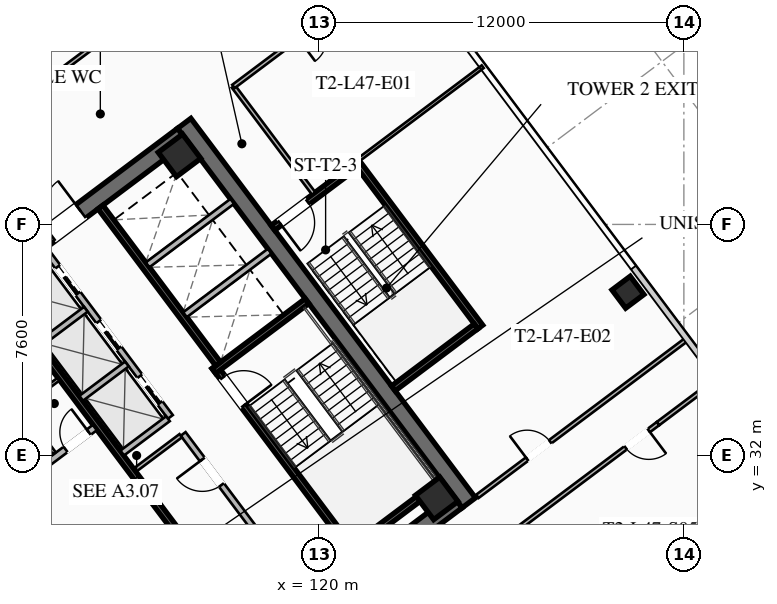
"""IFC4 building model, lengths in metres.
Left out: names, types, materials, properties, quantities, classifications, styles, units other than length and angle.
Written with IfcOpenShell. Run it as: python <this file> out.ifc"""

import sys

from ifc_helpers import new_model, si_unit, direction, frame, frame_2d, origin, origin_2d, place, context, subcontext, project, spatial, rectangle, hollow_rectangle, extrude, element, fill, save


model = new_model("IFC4")
c1 = context("Model", 3, precision=1e-05, world=origin(), true_north=direction((0.0, 1.0)))
c2 = subcontext(c1, "Body", "Model", "MODEL_VIEW")
j1 = project(units=[si_unit("LENGTHUNIT", "METRE"), si_unit("PLANEANGLEUNIT", "RADIAN")], contexts=[c1])
p1 = place(None, origin())
s1 = spatial("IfcSite", under=j1, at=p1, CompositionType="ELEMENT")
p2 = place(p1, origin())
s2 = spatial("IfcBuilding", under=s1, at=p2, CompositionType="ELEMENT")
p3 = place(p2, frame((0.0, 0.0, 174.75)))
s3 = spatial("IfcBuildingStorey", under=s2, at=p3, CompositionType="ELEMENT", Elevation=174.75)
for number, where, z_axis, x_axis in (
    (1, (112.436, 21.077, 0.0), (0.0, 0.0, 1.0), (-0.6, 0.8, 0.0)),
    (2, (115.564, 42.923, 0.0), (0.0, 0.0, 1.0), (0.6, -0.8, 0.0)),
):
    element("IfcWall", number, at=place(p3, frame(where, z_axis=z_axis, x_axis=x_axis)), inside=s3, PredefinedType="SHEAR", context=c2, shape_type="SweptSolid", body=[
        extrude(rectangle(XDim=15.6, YDim=0.55, at=frame_2d((7.8, 0.0))), origin(), (0.0, 0.0, 1.0), 3.55),
    ])
p4 = place(p3, frame((124.539, 30.498, 0.0), z_axis=(0.0, 0.0, 1.0), x_axis=(-0.799998054672, -0.600002593761, 0.0)))
e3 = element("IfcWall", 3, at=p4, inside=s3, PredefinedType="SHEAR", context=c2, shape_type="SweptSolid", body=[
    extrude(rectangle(XDim=15.06, YDim=0.55, at=frame_2d((7.53, 0.0))), origin(), (0.0, 0.0, 1.0), 3.55),
])
p5 = place(p4, frame((9.23, 0.0, 0.0)))
e4 = element("IfcOpeningElement", 4, at=p5, cuts=e3, PredefinedType="OPENING", context=c2, shape_type="SweptSolid", body=[
    extrude(rectangle(XDim=1.25, YDim=2.25, at=frame_2d((0.625, 1.125))), frame((0.0, 0.285, 0.0), z_axis=(0.0, -1.0, 0.0), x_axis=(1.0, 0.0, 0.0)), (0.0, 0.0, 1.0), 0.57),
])
p6 = place(p4, frame((4.18, 0.0, 0.0)))
e5 = element("IfcOpeningElement", 5, at=p6, cuts=e3, PredefinedType="OPENING", context=c2, shape_type="SweptSolid", body=[
    extrude(rectangle(XDim=1.25, YDim=2.25, at=frame_2d((0.625, 1.125))), frame((0.0, 0.285, 0.0), z_axis=(0.0, -1.0, 0.0), x_axis=(1.0, 0.0, 0.0)), (0.0, 0.0, 1.0), 0.57),
])
p7 = place(p3, frame((103.461, 33.502, 0.0), z_axis=(0.0, 0.0, 1.0), x_axis=(0.799998054672, 0.600002593761, 0.0)))
e6 = element("IfcWall", 6, at=p7, inside=s3, PredefinedType="SHEAR", context=c2, shape_type="SweptSolid", body=[
    extrude(rectangle(XDim=15.06, YDim=0.55, at=frame_2d((7.53, 0.0))), origin(), (0.0, 0.0, 1.0), 3.55),
])
p8 = place(p7, frame((4.58, 0.0, 0.0)))
e7 = element("IfcOpeningElement", 7, at=p8, cuts=e6, PredefinedType="OPENING", context=c2, shape_type="SweptSolid", body=[
    extrude(rectangle(XDim=1.25, YDim=2.25, at=frame_2d((0.625, 1.125))), frame((0.0, 0.285, 0.0), z_axis=(0.0, -1.0, 0.0), x_axis=(1.0, 0.0, 0.0)), (0.0, 0.0, 1.0), 0.57),
])
p9 = place(p7, frame((9.63, 0.0, 0.0)))
e8 = element("IfcOpeningElement", 8, at=p9, cuts=e6, PredefinedType="OPENING", context=c2, shape_type="SweptSolid", body=[
    extrude(rectangle(XDim=1.25, YDim=2.25, at=frame_2d((0.625, 1.125))), frame((0.0, 0.285, 0.0), z_axis=(0.0, -1.0, 0.0), x_axis=(1.0, 0.0, 0.0)), (0.0, 0.0, 1.0), 0.57),
])
for number, where, z_axis, x_axis in (
    (9, (123.87, 30.59, 0.0), (0.0, 0.0, 1.0), (0.8, 0.6, 0.0)),
    (10, (115.41, 41.87, 0.0), (0.0, 0.0, 1.0), (0.8, 0.6, 0.0)),
):
    element("IfcColumn", number, at=place(p3, frame(where, z_axis=z_axis, x_axis=x_axis)), inside=s3, PredefinedType="COLUMN", context=c2, shape_type="SweptSolid", body=[
        extrude(hollow_rectangle(XDim=1.0, YDim=1.0, WallThickness=0.04, at=origin_2d()), origin(), (0.0, 0.0, 1.0), 3.37),
    ])
p10 = place(p3, frame((130.16, 37.37, 0.0), z_axis=(0.0, 0.0, 1.0), x_axis=(0.799999996291, 0.600000004945, 0.0)))
e11 = element("IfcColumn", 11, at=p10, inside=s3, PredefinedType="COLUMN", context=c2, shape_type="SweptSolid", body=[
    extrude(hollow_rectangle(XDim=0.75, YDim=0.75, WallThickness=0.032, at=origin_2d()), origin(), (0.0, 0.0, 1.0), 3.37),
])
p11 = place(p3, frame((111.44, 29.08, 0.0), z_axis=(0.0, 0.0, 1.0), x_axis=(-0.59999029481, 0.8000072788, 0.0)))
e12 = element("IfcWall", 12, at=p11, inside=s3, PredefinedType="SHEAR", context=c2, shape_type="SweptSolid", body=[
    extrude(rectangle(XDim=8.05, YDim=0.2, at=frame_2d((4.025, 0.0))), origin(), (0.0, 0.0, 1.0), 3.37),
])
p12 = place(p11, frame((0.45, 0.0, 0.0)))
e13 = element("IfcOpeningElement", 13, at=p12, cuts=e12, PredefinedType="OPENING", context=c2, shape_type="SweptSolid", body=[
    extrude(rectangle(XDim=1.15, YDim=2.2, at=frame_2d((0.575, 1.1))), frame((0.0, 0.11, 0.0), z_axis=(0.0, -1.0, 0.0), x_axis=(1.0, 0.0, 0.0)), (0.0, 0.0, 1.0), 0.22),
])
p13 = place(p3, frame((116.56, 34.92, 0.0), z_axis=(0.0, 0.0, 1.0), x_axis=(0.59999029481, -0.8000072788, 0.0)))
e14 = element("IfcWall", 14, at=p13, inside=s3, PredefinedType="SHEAR", context=c2, shape_type="SweptSolid", body=[
    extrude(rectangle(XDim=8.05, YDim=0.2, at=frame_2d((4.025, 0.0))), origin(), (0.0, 0.0, 1.0), 3.37),
])
p14 = place(p13, frame((0.45, 0.0, 0.0)))
e15 = element("IfcOpeningElement", 15, at=p14, cuts=e14, PredefinedType="OPENING", context=c2, shape_type="SweptSolid", body=[
    extrude(rectangle(XDim=1.15, YDim=2.2, at=frame_2d((0.575, 1.1))), frame((0.0, 0.11, 0.0), z_axis=(0.0, -1.0, 0.0), x_axis=(1.0, 0.0, 0.0)), (0.0, 0.0, 1.0), 0.22),
])
for number, where, z_axis, x_axis in (
    (16, (116.54, 34.78, 0.0), (0.0, 0.0, 1.0), (0.8, 0.6, 0.0)),
    (17, (120.98, 28.86, 0.0), (0.0, 0.0, 1.0), (0.8, 0.6, 0.0)),
):
    element("IfcWall", number, at=place(p3, frame(where, z_axis=z_axis, x_axis=x_axis)), inside=s3, PredefinedType="SHEAR", context=c2, shape_type="SweptSolid", body=[
        extrude(rectangle(XDim=3.83, YDim=0.2, at=frame_2d((1.915, 0.0))), origin(), (0.0, 0.0, 1.0), 3.37),
    ])
p15 = place(p3, frame((117.998, 25.936, 0.0), z_axis=(0.0, 0.0, 1.0), x_axis=(-0.600002693989, 0.799997979501, 0.0)))
e18 = element("IfcWall", 18, at=p15, inside=s3, PredefinedType="SHEAR", context=c2, shape_type="SweptSolid", body=[
    extrude(rectangle(XDim=14.5, YDim=0.2, at=frame_2d((7.25, 0.0))), origin(), (0.0, 0.0, 1.0), 3.37),
])
p16 = place(p3, frame((110.104, 31.028, 0.0), z_axis=(0.0, 0.0, 1.0), x_axis=(0.800018601094, 0.59997519774, 0.0)))
e19 = element("IfcWall", 19, at=p16, inside=s3, PredefinedType="SOLIDWALL", context=c2, shape_type="SweptSolid", body=[
    extrude(rectangle(XDim=3.15, YDim=0.22, at=frame_2d((1.575, 0.0))), origin(), (0.0, 0.0, 1.0), 2.723),
])
p17 = place(p16, frame((0.25, 0.0, 0.0)))
e20 = element("IfcOpeningElement", 20, at=p17, cuts=e19, PredefinedType="OPENING", context=c2, shape_type="SweptSolid", body=[
    extrude(rectangle(XDim=0.95, YDim=2.05, at=frame_2d((0.475, 1.025))), frame((0.0, 0.12, 0.0), z_axis=(0.0, -1.0, 0.0), x_axis=(1.0, 0.0, 0.0)), (0.0, 0.0, 1.0), 0.24),
])
p18 = place(p16, frame((1.95, 0.0, 0.0)))
e21 = element("IfcOpeningElement", 21, at=p18, cuts=e19, PredefinedType="OPENING", context=c2, shape_type="SweptSolid", body=[
    extrude(rectangle(XDim=0.95, YDim=2.05, at=frame_2d((0.475, 1.025))), frame((0.0, 0.12, 0.0), z_axis=(0.0, -1.0, 0.0), x_axis=(1.0, 0.0, 0.0)), (0.0, 0.0, 1.0), 0.24),
])
p19 = place(p3, frame((112.81, 40.17, 0.0), z_axis=(0.0, 0.0, 1.0), x_axis=(0.599993943644, -0.800004542231, 0.0)))
e22 = element("IfcWall", 22, at=p19, inside=s3, PredefinedType="SHEAR", context=c2, shape_type="SweptSolid", body=[
    extrude(rectangle(XDim=6.45, YDim=0.2, at=frame_2d((3.225, 0.0))), origin(), (0.0, 0.0, 1.0), 3.37),
])
for number, where, z_axis, x_axis in (
    (23, (115.59, 36.63, 0.0), (0.0, 0.0, 1.0), (0.8, 0.6, 0.0)),
    (24, (114.36, 38.27, 0.0), (0.0, 0.0, 1.0), (0.8, 0.6, 0.0)),
):
    element("IfcWall", number, at=place(p3, frame(where, z_axis=z_axis, x_axis=x_axis)), inside=s3, PredefinedType="SOLIDWALL", context=c2, shape_type="SweptSolid", body=[
        extrude(rectangle(XDim=3.48, YDim=0.2, at=frame_2d((1.74, 0.0))), origin(), (0.0, 0.0, 1.0), 3.37),
    ])
p20 = place(p3, frame((111.296, 32.072, 0.0), z_axis=(0.0, 0.0, 1.0), x_axis=(-0.59995887973, 0.800030838552, 0.0)))
e25 = element("IfcWall", 25, at=p20, inside=s3, PredefinedType="PARTITIONING", context=c2, shape_type="SweptSolid", body=[
    extrude(rectangle(XDim=3.8, YDim=0.11, at=frame_2d((1.9, 0.0))), origin(), (0.0, 0.0, 1.0), 2.723),
])
p21 = place(p3, frame((108.91, 32.62, 0.0), z_axis=(0.0, 0.0, 1.0), x_axis=(0.800018601094, 0.59997519774, 0.0)))
e26 = element("IfcWall", 26, at=p21, inside=s3, PredefinedType="PARTITIONING", context=c2, shape_type="SweptSolid", body=[
    extrude(rectangle(XDim=3.15, YDim=0.11, at=frame_2d((1.575, 0.0))), origin(), (0.0, 0.0, 1.0), 2.723),
])
p22 = place(p3, frame((119.67, 27.19, 0.0), z_axis=(0.0, 0.0, 1.0), x_axis=(-0.599988677396, 0.800008491828, 0.0)))
e27 = element("IfcWall", 27, at=p22, inside=s3, PredefinedType="SOLIDWALL", context=c2, shape_type="SweptSolid", body=[
    extrude(rectangle(XDim=6.9, YDim=0.2, at=frame_2d((3.45, 0.0))), origin(), (0.0, 0.0, 1.0), 2.723),
])
p23 = place(p22, frame((0.85, 0.0, 0.0)))
e28 = element("IfcOpeningElement", 28, at=p23, cuts=e27, PredefinedType="OPENING", context=c2, shape_type="SweptSolid", body=[
    extrude(rectangle(XDim=0.95, YDim=2.05, at=frame_2d((0.475, 1.025))), frame((0.0, 0.11, 0.0), z_axis=(0.0, -1.0, 0.0), x_axis=(1.0, 0.0, 0.0)), (0.0, 0.0, 1.0), 0.22),
])
p24 = place(p22, frame((4.8, 0.0, 0.0)))
e29 = element("IfcOpeningElement", 29, at=p24, cuts=e27, PredefinedType="OPENING", context=c2, shape_type="SweptSolid", body=[
    extrude(rectangle(XDim=1.05, YDim=2.2, at=frame_2d((0.525, 1.1))), frame((0.0, 0.11, 0.0), z_axis=(0.0, -1.0, 0.0), x_axis=(1.0, 0.0, 0.0)), (0.0, 0.0, 1.0), 0.22),
])
p25 = place(p3, frame((113.946, 31.522, 0.0), z_axis=(0.0, 0.0, 1.0), x_axis=(0.8, 0.6, 0.0)))
e30 = element("IfcWall", 30, at=p25, inside=s3, PredefinedType="PARTITIONING", context=c2, shape_type="SweptSolid", body=[
    extrude(rectangle(XDim=1.88, YDim=0.135, at=frame_2d((0.94, 0.0))), origin(), (0.0, 0.0, 1.0), 2.723),
])
p26 = place(p3, frame((115.11, 33.27, 0.0), z_axis=(0.0, 0.0, 1.0), x_axis=(-0.600011322243, 0.799991508192, 0.0)))
e31 = element("IfcWall", 31, at=p26, inside=s3, PredefinedType="SOLIDWALL", context=c2, shape_type="SweptSolid", body=[
    extrude(rectangle(XDim=6.9, YDim=0.2, at=frame_2d((3.45, 0.0))), origin(), (0.0, 0.0, 1.0), 3.37),
])
p27 = place(p26, frame((0.575, 0.0, 0.0)))
e32 = element("IfcOpeningElement", 32, at=p27, cuts=e31, PredefinedType="OPENING", context=c2, shape_type="SweptSolid", body=[
    extrude(rectangle(XDim=1.1, YDim=2.2, at=frame_2d((0.55, 1.1))), frame((0.0, 0.11, 0.0), z_axis=(0.0, -1.0, 0.0), x_axis=(1.0, 0.0, 0.0)), (0.0, 0.0, 1.0), 0.22),
])
p28 = place(p26, frame((2.825, 0.0, 0.0)))
e33 = element("IfcOpeningElement", 33, at=p28, cuts=e31, PredefinedType="OPENING", context=c2, shape_type="SweptSolid", body=[
    extrude(rectangle(XDim=1.1, YDim=2.2, at=frame_2d((0.55, 1.1))), frame((0.0, 0.11, 0.0), z_axis=(0.0, -1.0, 0.0), x_axis=(1.0, 0.0, 0.0)), (0.0, 0.0, 1.0), 0.22),
])
p29 = place(p26, frame((5.075, 0.0, 0.0)))
e34 = element("IfcOpeningElement", 34, at=p29, cuts=e31, PredefinedType="OPENING", context=c2, shape_type="SweptSolid", body=[
    extrude(rectangle(XDim=1.1, YDim=2.2, at=frame_2d((0.55, 1.1))), frame((0.0, 0.11, 0.0), z_axis=(0.0, -1.0, 0.0), x_axis=(1.0, 0.0, 0.0)), (0.0, 0.0, 1.0), 0.22),
])
p30 = place(p3, frame((113.526, 32.082, 0.0), z_axis=(0.0, 0.0, 1.0), x_axis=(0.800046745961, 0.599937666993, 0.0)))
e35 = element("IfcWall", 35, at=p30, inside=s3, PredefinedType="SOLIDWALL", context=c2, shape_type="SweptSolid", body=[
    extrude(rectangle(XDim=1.88, YDim=0.2, at=frame_2d((0.94, 0.0))), origin(), (0.0, 0.0, 1.0), 3.37),
])
p31 = place(p3, frame((112.176, 33.882, 0.0), z_axis=(0.0, 0.0, 1.0), x_axis=(0.8, 0.6, 0.0)))
e36 = element("IfcWall", 36, at=p31, inside=s3, PredefinedType="SOLIDWALL", context=c2, shape_type="SweptSolid", body=[
    extrude(rectangle(XDim=1.88, YDim=0.2, at=frame_2d((0.94, 0.0))), origin(), (0.0, 0.0, 1.0), 3.37),
])
p32 = place(p3, frame((110.826, 35.682, 0.0), z_axis=(0.0, 0.0, 1.0), x_axis=(0.799984418148, 0.600020775241, 0.0)))
e37 = element("IfcWall", 37, at=p32, inside=s3, PredefinedType="SOLIDWALL", context=c2, shape_type="SweptSolid", body=[
    extrude(rectangle(XDim=1.88, YDim=0.2, at=frame_2d((0.94, 0.0))), origin(), (0.0, 0.0, 1.0), 3.37),
])
p33 = place(p3, frame((125.304, 36.228, 0.0), z_axis=(0.0, 0.0, 1.0), x_axis=(-0.59998851072, 0.800008616831, 0.0)))
e38 = element("IfcWall", 38, at=p33, inside=s3, PredefinedType="SHEAR", context=c2, shape_type="SweptSolid", body=[
    extrude(rectangle(XDim=6.8, YDim=0.2, at=frame_2d((3.4, 0.0))), origin(), (0.0, 0.0, 1.0), 3.37),
])
p34 = place(p3, frame((121.204, 41.528, 0.0), z_axis=(0.0, 0.0, 1.0), x_axis=(-0.800017232136, -0.599977023131, 0.0)))
e39 = element("IfcWall", 39, at=p34, inside=s3, PredefinedType="SHEAR", context=c2, shape_type="SweptSolid", body=[
    extrude(rectangle(XDim=3.4, YDim=0.2, at=frame_2d((1.7, 0.0))), origin(), (0.0, 0.0, 1.0), 3.37),
])
p35 = place(p34, frame((1.975, 0.0, 0.0)))
e40 = element("IfcOpeningElement", 40, at=p35, cuts=e39, PredefinedType="OPENING", context=c2, shape_type="SweptSolid", body=[
    extrude(rectangle(XDim=1.15, YDim=2.2, at=frame_2d((0.575, 1.1))), frame((0.0, 0.11, 0.0), z_axis=(0.0, -1.0, 0.0), x_axis=(1.0, 0.0, 0.0)), (0.0, 0.0, 1.0), 0.22),
])
p36 = place(p3, frame((122.444, 34.208, 0.0), z_axis=(0.0, 0.0, 1.0), x_axis=(0.79999138319, 0.600011488909, 0.0)))
e41 = element("IfcWall", 41, at=p36, inside=s3, PredefinedType="SHEAR", context=c2, shape_type="SweptSolid", body=[
    extrude(rectangle(XDim=3.4, YDim=0.2, at=frame_2d((1.7, 0.0))), origin(), (0.0, 0.0, 1.0), 3.37),
])
p37 = place(p3, frame((119.824, 40.618, 0.0), z_axis=(0.0, 0.0, 1.0), x_axis=(-0.599982243973, 0.800013316712, 0.0)))
e42 = element("IfcWall", 42, at=p37, inside=s3, PredefinedType="PARTITIONING", context=c2, shape_type="SweptSolid", body=[
    extrude(rectangle(XDim=4.4, YDim=0.135, at=frame_2d((2.2, 0.0))), origin(), (0.0, 0.0, 1.0), 2.723),
])
p38 = place(p3, frame((95.548, 32.686, 0.0), z_axis=(0.0, 0.0, 1.0), x_axis=(0.8, 0.6, 0.0)))
e43 = element("IfcWall", 43, at=p38, inside=s3, PredefinedType="PARTITIONING", context=c2, shape_type="SweptSolid", body=[
    extrude(rectangle(XDim=28.7, YDim=0.135, at=frame_2d((14.35, 0.0))), origin(), (0.0, 0.0, 1.0), 2.723),
])
p39 = place(p38, frame((0.3, 0.0, 0.0)))
e44 = element("IfcOpeningElement", 44, at=p39, cuts=e43, PredefinedType="OPENING", context=c2, shape_type="SweptSolid", body=[
    extrude(rectangle(XDim=0.95, YDim=2.05, at=frame_2d((0.475, 1.025))), frame((0.0, 0.077, 0.0), z_axis=(0.0, -1.0, 0.0), x_axis=(1.0, 0.0, 0.0)), (0.0, 0.0, 1.0), 0.155),
])
p40 = place(p38, frame((27.45, 0.0, 0.0)))
e45 = element("IfcOpeningElement", 45, at=p40, cuts=e43, PredefinedType="OPENING", context=c2, shape_type="SweptSolid", body=[
    extrude(rectangle(XDim=0.95, YDim=2.05, at=frame_2d((0.475, 1.025))), frame((0.0, 0.077, 0.0), z_axis=(0.0, -1.0, 0.0), x_axis=(1.0, 0.0, 0.0)), (0.0, 0.0, 1.0), 0.155),
])
p41 = place(p3, frame((131.15, 33.05, 0.0), z_axis=(0.0, 0.0, 1.0), x_axis=(-0.8, -0.6, 0.0)))
e46 = element("IfcWall", 46, at=p41, inside=s3, PredefinedType="PARTITIONING", context=c2, shape_type="SweptSolid", body=[
    extrude(rectangle(XDim=28.7, YDim=0.135, at=frame_2d((14.35, 0.0))), origin(), (0.0, 0.0, 1.0), 2.723),
])
p42 = place(p41, frame((27.37, 0.0, 0.0)))
e47 = element("IfcOpeningElement", 47, at=p42, cuts=e46, PredefinedType="OPENING", context=c2, shape_type="SweptSolid", body=[
    extrude(rectangle(XDim=0.95, YDim=2.05, at=frame_2d((0.475, 1.025))), frame((0.0, 0.077, 0.0), z_axis=(0.0, -1.0, 0.0), x_axis=(1.0, 0.0, 0.0)), (0.0, 0.0, 1.0), 0.155),
])
p43 = place(p41, frame((17.851, 0.0, 0.0)))
e48 = element("IfcOpeningElement", 48, at=p43, cuts=e46, PredefinedType="OPENING", context=c2, shape_type="SweptSolid", body=[
    extrude(rectangle(XDim=0.95, YDim=2.05, at=frame_2d((0.475, 1.025))), frame((0.0, 0.077, 0.0), z_axis=(0.0, -1.0, 0.0), x_axis=(1.0, 0.0, 0.0)), (0.0, 0.0, 1.0), 0.155),
])
p44 = place(p41, frame((13.601, 0.0, 0.0)))
e49 = element("IfcOpeningElement", 49, at=p44, cuts=e46, PredefinedType="OPENING", context=c2, shape_type="SweptSolid", body=[
    extrude(rectangle(XDim=0.95, YDim=2.05, at=frame_2d((0.475, 1.025))), frame((0.0, 0.077, 0.0), z_axis=(0.0, -1.0, 0.0), x_axis=(1.0, 0.0, 0.0)), (0.0, 0.0, 1.0), 0.155),
])
p45 = place(p41, frame((9.62, 0.0, 0.0)))
e50 = element("IfcOpeningElement", 50, at=p45, cuts=e46, PredefinedType="OPENING", context=c2, shape_type="SweptSolid", body=[
    extrude(rectangle(XDim=0.95, YDim=2.05, at=frame_2d((0.475, 1.025))), frame((0.0, 0.077, 0.0), z_axis=(0.0, -1.0, 0.0), x_axis=(1.0, 0.0, 0.0)), (0.0, 0.0, 1.0), 0.155),
])
p46 = place(p41, frame((0.38, 0.0, 0.0)))
e51 = element("IfcOpeningElement", 51, at=p46, cuts=e46, PredefinedType="OPENING", context=c2, shape_type="SweptSolid", body=[
    extrude(rectangle(XDim=0.95, YDim=2.05, at=frame_2d((0.475, 1.025))), frame((0.0, 0.077, 0.0), z_axis=(0.0, -1.0, 0.0), x_axis=(1.0, 0.0, 0.0)), (0.0, 0.0, 1.0), 0.155),
])
p47 = place(p3, frame((131.15, 33.05, 0.0), z_axis=(0.0, 0.0, 1.0), x_axis=(0.800012055778, 0.599983925293, 0.0)))
e52 = element("IfcWall", 52, at=p47, inside=s3, PredefinedType="PARTITIONING", context=c2, shape_type="SweptSolid", body=[
    extrude(rectangle(XDim=2.43, YDim=0.135, at=frame_2d((1.215, 0.0))), origin(), (0.0, 0.0, 1.0), 2.723),
])
p48 = place(p3, frame((122.744, 48.308, 0.0), z_axis=(0.0, 0.0, 1.0), x_axis=(-0.79997892247, -0.600028102345, 0.0)))
e53 = element("IfcWall", 53, at=p48, inside=s3, PredefinedType="PARTITIONING", context=c2, shape_type="SweptSolid", body=[
    extrude(rectangle(XDim=6.95, YDim=0.135, at=frame_2d((3.475, 0.0))), origin(), (0.0, 0.0, 1.0), 2.723),
])
p49 = place(p48, frame((3.35, 0.0, 0.0)))
e54 = element("IfcOpeningElement", 54, at=p49, cuts=e53, PredefinedType="OPENING", context=c2, shape_type="SweptSolid", body=[
    extrude(rectangle(XDim=0.95, YDim=2.05, at=frame_2d((0.475, 1.025))), frame((0.0, 0.077, 0.0), z_axis=(0.0, -1.0, 0.0), x_axis=(1.0, 0.0, 0.0)), (0.0, 0.0, 1.0), 0.155),
])
p50 = place(p3, frame((125.208, 30.656, 0.0), z_axis=(0.0, 0.0, 1.0), x_axis=(0.800006797429, 0.599990936654, 0.0)))
e55 = element("IfcWall", 55, at=p50, inside=s3, PredefinedType="PARTITIONING", context=c2, shape_type="SweptSolid", body=[
    extrude(rectangle(XDim=8.62, YDim=0.135, at=frame_2d((4.31, 0.0))), origin(), (0.0, 0.0, 1.0), 2.723),
])
p51 = place(p50, frame((2.045, 0.0, 0.0)))
e56 = element("IfcOpeningElement", 56, at=p51, cuts=e55, PredefinedType="OPENING", context=c2, shape_type="SweptSolid", body=[
    extrude(rectangle(XDim=0.95, YDim=2.05, at=frame_2d((0.475, 1.025))), frame((0.0, 0.077, 0.0), z_axis=(0.0, -1.0, 0.0), x_axis=(1.0, 0.0, 0.0)), (0.0, 0.0, 1.0), 0.155),
])
p52 = place(p3, frame((125.384, 44.788, 0.0), z_axis=(0.0, 0.0, 1.0), x_axis=(-0.8, -0.6, 0.0)))
e57 = element("IfcWall", 57, at=p52, inside=s3, PredefinedType="PARTITIONING", context=c2, shape_type="SweptSolid", body=[
    extrude(rectangle(XDim=5.1, YDim=0.11, at=frame_2d((2.55, 0.0))), origin(), (0.0, 0.0, 1.0), 2.723),
])
p53 = place(p3, frame((112.104, 20.928, 0.0), z_axis=(0.0, 0.0, 1.0), x_axis=(-0.599994940075, 0.800003794918, 0.0)))
e58 = element("IfcWall", 58, at=p53, inside=s3, PredefinedType="PARTITIONING", context=c2, shape_type="SweptSolid", body=[
    extrude(rectangle(XDim=15.44, YDim=0.135, at=frame_2d((7.72, 0.0))), origin(), (0.0, 0.0, 1.0), 2.723),
])
p54 = place(p9, origin())
e59 = element("IfcDoor", 59, at=p54, inside=s3, OperationType="SINGLE_SWING_RIGHT", PredefinedType="DOOR", context=c2, shape_type="SweptSolid", body=[
    extrude(rectangle(XDim=1.25, YDim=2.25, at=frame_2d((0.625, 1.125))), frame((0.0, 0.025, 0.0), z_axis=(0.0, -1.0, 0.0), x_axis=(1.0, 0.0, 0.0)), (0.0, 0.0, 1.0), 0.05),
])
fill(e8, e59)
p55 = place(p14, origin())
e60 = element("IfcDoor", 60, at=p55, inside=s3, OperationType="SINGLE_SWING_RIGHT", PredefinedType="DOOR", context=c2, shape_type="SweptSolid", body=[
    extrude(rectangle(XDim=1.15, YDim=2.2, at=frame_2d((0.575, 1.1))), frame((0.0, 0.025, 0.0), z_axis=(0.0, -1.0, 0.0), x_axis=(1.0, 0.0, 0.0)), (0.0, 0.0, 1.0), 0.05),
])
fill(e15, e60)
p56 = place(p18, origin())
e61 = element("IfcDoor", 61, at=p56, inside=s3, OperationType="SINGLE_SWING_RIGHT", PredefinedType="DOOR", context=c2, shape_type="SweptSolid", body=[
    extrude(rectangle(XDim=0.95, YDim=2.05, at=frame_2d((0.475, 1.025))), frame((0.0, 0.025, 0.0), z_axis=(0.0, -1.0, 0.0), x_axis=(1.0, 0.0, 0.0)), (0.0, 0.0, 1.0), 0.05),
])
fill(e21, e61)
p57 = place(p24, origin())
e62 = element("IfcDoor", 62, at=p57, inside=s3, OperationType="SINGLE_SWING_RIGHT", PredefinedType="DOOR", context=c2, shape_type="SweptSolid", body=[
    extrude(rectangle(XDim=1.05, YDim=2.2, at=frame_2d((0.525, 1.1))), frame((0.0, 0.025, 0.0), z_axis=(0.0, -1.0, 0.0), x_axis=(1.0, 0.0, 0.0)), (0.0, 0.0, 1.0), 0.05),
])
fill(e29, e62)
p58 = place(p35, origin())
e63 = element("IfcDoor", 63, at=p58, inside=s3, OperationType="SINGLE_SWING_RIGHT", PredefinedType="DOOR", context=c2, shape_type="SweptSolid", body=[
    extrude(rectangle(XDim=1.15, YDim=2.2, at=frame_2d((0.575, 1.1))), frame((0.0, 0.025, 0.0), z_axis=(0.0, -1.0, 0.0), x_axis=(1.0, 0.0, 0.0)), (0.0, 0.0, 1.0), 0.05),
])
fill(e40, e63)
p59 = place(p46, origin())
e64 = element("IfcDoor", 64, at=p59, inside=s3, OperationType="SINGLE_SWING_LEFT", PredefinedType="DOOR", context=c2, shape_type="SweptSolid", body=[
    extrude(rectangle(XDim=0.95, YDim=2.05, at=frame_2d((0.475, 1.025))), frame((0.0, 0.025, 0.0), z_axis=(0.0, -1.0, 0.0), x_axis=(1.0, 0.0, 0.0)), (0.0, 0.0, 1.0), 0.05),
])
fill(e51, e64)
p60 = place(p51, origin())
e65 = element("IfcDoor", 65, at=p60, inside=s3, OperationType="SINGLE_SWING_LEFT", PredefinedType="DOOR", context=c2, shape_type="SweptSolid", body=[
    extrude(rectangle(XDim=0.95, YDim=2.05, at=frame_2d((0.475, 1.025))), frame((0.0, 0.025, 0.0), z_axis=(0.0, -1.0, 0.0), x_axis=(1.0, 0.0, 0.0)), (0.0, 0.0, 1.0), 0.05),
])
fill(e56, e65)
p61 = place(p27, origin())
e66 = element("IfcDoor", 66, at=p61, inside=s3, OperationType="SLIDING_TO_LEFT", PredefinedType="DOOR", context=c2, shape_type="SweptSolid", body=[
    extrude(rectangle(XDim=1.1, YDim=2.2, at=frame_2d((0.55, 1.1))), frame((0.0, 0.025, 0.0), z_axis=(0.0, -1.0, 0.0), x_axis=(1.0, 0.0, 0.0)), (0.0, 0.0, 1.0), 0.05),
])
fill(e32, e66)
p62 = place(p28, origin())
e67 = element("IfcDoor", 67, at=p62, inside=s3, OperationType="SLIDING_TO_LEFT", PredefinedType="DOOR", context=c2, shape_type="SweptSolid", body=[
    extrude(rectangle(XDim=1.1, YDim=2.2, at=frame_2d((0.55, 1.1))), frame((0.0, 0.025, 0.0), z_axis=(0.0, -1.0, 0.0), x_axis=(1.0, 0.0, 0.0)), (0.0, 0.0, 1.0), 0.05),
])
fill(e33, e67)
p63 = place(p29, origin())
e68 = element("IfcDoor", 68, at=p63, inside=s3, OperationType="SLIDING_TO_LEFT", PredefinedType="DOOR", context=c2, shape_type="SweptSolid", body=[
    extrude(rectangle(XDim=1.1, YDim=2.2, at=frame_2d((0.55, 1.1))), frame((0.0, 0.025, 0.0), z_axis=(0.0, -1.0, 0.0), x_axis=(1.0, 0.0, 0.0)), (0.0, 0.0, 1.0), 0.05),
])
fill(e34, e68)
save(model, sys.argv[1])
